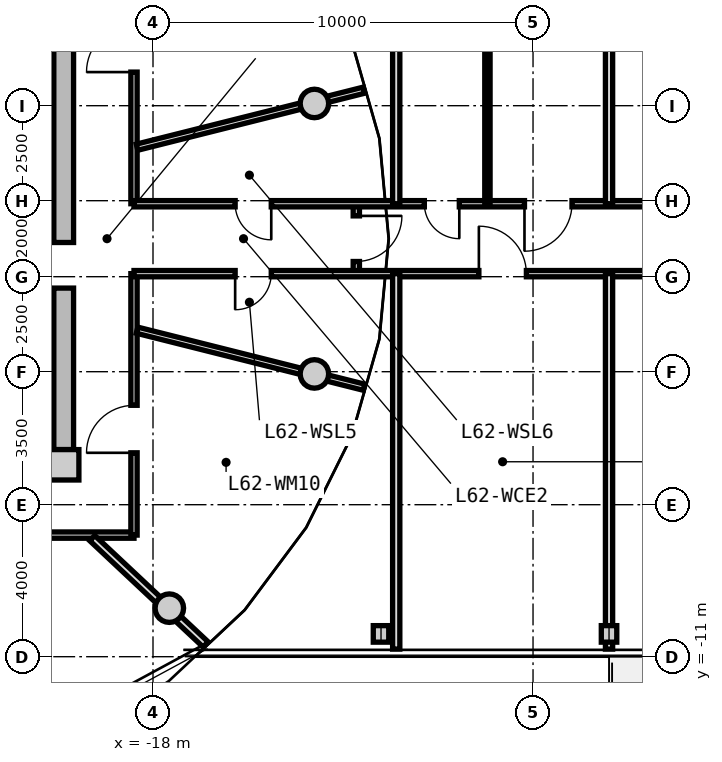
"""IFC4 building model, lengths in metres.
Left out: names, types, materials, properties, quantities, classifications, styles, units other than length and angle.
Written with IfcOpenShell. Run it as: python <this file> out.ifc"""

import sys

from ifc_helpers import new_model, si_unit, direction, frame, frame_2d, origin, origin_2d, place, context, subcontext, project, spatial, rectangle, circle, i_section, extrude, source, transform, mapped, element, fill, save


model = new_model("IFC4")
c1 = context("Model", 3, precision=1e-05, world=origin(), true_north=direction((0.0, 1.0)))
c2 = subcontext(c1, "Body", "Model", "MODEL_VIEW")
j1 = project(units=[si_unit("LENGTHUNIT", "METRE"), si_unit("PLANEANGLEUNIT", "RADIAN")], contexts=[c1])
p1 = place(None, origin())
s1 = spatial("IfcSite", under=j1, at=p1, CompositionType="ELEMENT")
p2 = place(p1, origin())
s2 = spatial("IfcBuilding", under=s1, at=p2, CompositionType="ELEMENT")
p3 = place(p2, frame((0.0, 0.0, 199.8)))
s3 = spatial("IfcBuildingStorey", under=s2, at=p3, CompositionType="ELEMENT", Elevation=199.8)
m1 = source(origin(), c2, "Body", "SweptSolid", [
    extrude(rectangle(XDim=0.8, YDim=0.8, at=origin_2d()), origin(), (0.0, 0.0, 1.0), 4.0),
])
p4 = place(p3, frame((-20.35, -5.95, 0.0), z_axis=(0.0, 0.0, 1.0), x_axis=(1.0, 0.0, 0.0)))
e1 = element("IfcColumn", 1, at=p4, inside=s3, PredefinedType="COLUMN", context=c2, shape_type="MappedRepresentation", body=[
    mapped(m1, transform((0.0, 0.0, 0.0), x_axis=(1.0, 0.0, 0.0), y_axis=(0.0, 1.0, 0.0), z_axis=(0.0, 0.0, 1.0), scale=1.0)),
])
m2 = source(origin(), c2, "Body", "SweptSolid", [
    extrude(rectangle(XDim=11.1, YDim=0.52, at=frame_2d((5.55, 0.0))), origin(), (0.0, 0.0, 1.0), 3.71),
])
p5 = place(p3, frame((-20.35, 5.55, 0.0), z_axis=(0.0, 0.0, 1.0), x_axis=(0.0, -1.0, 0.0)))
e2 = element("IfcWall", 2, at=p5, inside=s3, PredefinedType="SHEAR", context=c2, shape_type="MappedRepresentation", body=[
    mapped(m2, transform((0.0, 0.0, 0.0), x_axis=(1.0, 0.0, 0.0), y_axis=(0.0, 1.0, 0.0), z_axis=(0.0, 0.0, 1.0), scale=1.0)),
])
p6 = place(p5, frame((5.65, 0.0, 0.0)))
e3 = element("IfcOpeningElement", 3, at=p6, cuts=e2, PredefinedType="OPENING", context=c2, shape_type="SweptSolid", body=[
    extrude(rectangle(XDim=1.2, YDim=2.15, at=frame_2d((0.6, 1.075))), frame((0.0, 0.27, 0.0), z_axis=(0.0, -1.0, 0.0), x_axis=(1.0, 0.0, 0.0)), (0.0, 0.0, 1.0), 0.54),
])
m3 = source(origin(), c2, "Body", "SweptSolid", [
    extrude(circle(Radius=0.375, at=origin_2d()), origin(), (0.0, 0.0, 1.0), 4.0),
])
for number, where, z_axis, x_axis in (
    (4, (-13.753, 3.559, 0.0), (0.0, 0.0, 1.0), (1.0, 0.0, 0.0)),
    (5, (-17.57, -9.723, 0.0), (0.0, 0.0, 1.0), (1.0, 0.0, 0.0)),
    (6, (-13.753, -3.559, 0.0), (0.0, 0.0, 1.0), (1.0, 0.0, 0.0)),
):
    element("IfcColumn", number, at=place(p3, frame(where, z_axis=z_axis, x_axis=x_axis)), inside=s3, PredefinedType="COLUMN", context=c2, shape_type="MappedRepresentation", body=[
        mapped(m3, transform((0.0, 0.0, 0.0), x_axis=(1.0, 0.0, 0.0), y_axis=(0.0, 1.0, 0.0), z_axis=(0.0, 0.0, 1.0), scale=1.0)),
    ])
m4 = source(origin(), c2, "Body", "SweptSolid", [
    extrude(i_section(OverallWidth=0.407, OverallDepth=0.435, WebThickness=0.024, FlangeThickness=0.039, FilletRadius=0.015, at=origin_2d()), origin(), (0.0, 0.0, 1.0), 4.42),
])
for number, where, z_axis, x_axis in (
    (7, (-12.0, -10.4, -0.42), (0.0, 0.0, 1.0), (1.0, 0.0, 0.0)),
    (8, (-6.0, -10.4, -0.42), (0.0, 0.0, 1.0), (1.0, 0.0, 0.0)),
):
    element("IfcColumn", number, at=place(p3, frame(where, z_axis=z_axis, x_axis=x_axis)), inside=s3, PredefinedType="COLUMN", context=c2, shape_type="MappedRepresentation", body=[
        mapped(m4, transform((0.0, 0.0, 0.0), x_axis=(1.0, 0.0, 0.0), y_axis=(0.0, 1.0, 0.0), z_axis=(0.0, 0.0, 1.0), scale=1.0)),
    ])
m5 = source(origin(), c2, "Body", "SweptSolid", [
    extrude(rectangle(XDim=19.0, YDim=0.165, at=frame_2d((9.5, 0.0))), origin(), (0.0, 0.0, 1.0), 3.695),
])
p7 = place(p3, frame((-18.5, -7.8, 0.0), z_axis=(0.0, 0.0, 1.0), x_axis=(-1.0, 0.0, 0.0)))
e9 = element("IfcWall", 9, at=p7, inside=s3, PredefinedType="PARTITIONING", context=c2, shape_type="MappedRepresentation", body=[
    mapped(m5, transform((0.0, 0.0, 0.0), x_axis=(1.0, 0.0, 0.0), y_axis=(0.0, 1.0, 0.0), z_axis=(0.0, 0.0, 1.0), scale=1.0)),
])
p8 = place(p7, frame((15.586, 0.0, 0.0)))
e10 = element("IfcOpeningElement", 10, at=p8, cuts=e9, PredefinedType="OPENING", context=c2, shape_type="SweptSolid", body=[
    extrude(rectangle(XDim=1.05, YDim=2.15, at=frame_2d((0.525, 1.075))), frame((0.0, 0.093, 0.0), z_axis=(0.0, -1.0, 0.0), x_axis=(1.0, 0.0, 0.0)), (0.0, 0.0, 1.0), 0.185),
])
p9 = place(p7, frame((12.465, 0.0, 0.0)))
e11 = element("IfcOpeningElement", 11, at=p9, cuts=e9, PredefinedType="OPENING", context=c2, shape_type="SweptSolid", body=[
    extrude(rectangle(XDim=1.05, YDim=2.15, at=frame_2d((0.525, 1.075))), frame((0.0, 0.093, 0.0), z_axis=(0.0, -1.0, 0.0), x_axis=(1.0, 0.0, 0.0)), (0.0, 0.0, 1.0), 0.185),
])
p10 = place(p7, frame((8.875, 0.0, 0.0)))
e12 = element("IfcOpeningElement", 12, at=p10, cuts=e9, PredefinedType="OPENING", context=c2, shape_type="SweptSolid", body=[
    extrude(rectangle(XDim=1.25, YDim=2.2, at=frame_2d((0.625, 1.1))), frame((0.0, 0.093, 0.0), z_axis=(0.0, -1.0, 0.0), x_axis=(1.0, 0.0, 0.0)), (0.0, 0.0, 1.0), 0.185),
])
p11 = place(p7, frame((3.559, 0.0, 0.0)))
e13 = element("IfcOpeningElement", 13, at=p11, cuts=e9, PredefinedType="OPENING", context=c2, shape_type="SweptSolid", body=[
    extrude(rectangle(XDim=1.25, YDim=2.2, at=frame_2d((0.625, 1.1))), frame((0.0, 0.093, 0.0), z_axis=(0.0, -1.0, 0.0), x_axis=(1.0, 0.0, 0.0)), (0.0, 0.0, 1.0), 0.185),
])
m6 = source(origin(), c2, "Body", "SweptSolid", [
    extrude(rectangle(XDim=6.88, YDim=0.165, at=frame_2d((3.44, 0.0))), origin(), (0.0, 0.0, 1.0), 3.695),
])
p12 = place(p3, frame((-18.5, 7.8, 0.0), z_axis=(0.0, 0.0, 1.0), x_axis=(0.0, -1.0, 0.0)))
e14 = element("IfcWall", 14, at=p12, inside=s3, PredefinedType="PARTITIONING", context=c2, shape_type="MappedRepresentation", body=[
    mapped(m6, transform((0.0, 0.0, 0.0), x_axis=(1.0, 0.0, 0.0), y_axis=(0.0, 1.0, 0.0), z_axis=(0.0, 0.0, 1.0), scale=1.0)),
])
p13 = place(p12, frame((2.166, 0.0, 0.0)))
e15 = element("IfcOpeningElement", 15, at=p13, cuts=e14, PredefinedType="OPENING", context=c2, shape_type="SweptSolid", body=[
    extrude(rectangle(XDim=1.25, YDim=2.2, at=frame_2d((0.625, 1.1))), frame((0.0, 0.093, 0.0), z_axis=(0.0, -1.0, 0.0), x_axis=(1.0, 0.0, 0.0)), (0.0, 0.0, 1.0), 0.185),
])
p14 = place(p3, frame((-18.5, -0.92, 0.0), z_axis=(0.0, 0.0, 1.0), x_axis=(0.0, -1.0, 0.0)))
e16 = element("IfcWall", 16, at=p14, inside=s3, PredefinedType="PARTITIONING", context=c2, shape_type="MappedRepresentation", body=[
    mapped(m6, transform((0.0, 0.0, 0.0), x_axis=(1.0, 0.0, 0.0), y_axis=(0.0, 1.0, 0.0), z_axis=(0.0, 0.0, 1.0), scale=1.0)),
])
p15 = place(p14, frame((3.464, 0.0, 0.0)))
e17 = element("IfcOpeningElement", 17, at=p15, cuts=e16, PredefinedType="OPENING", context=c2, shape_type="SweptSolid", body=[
    extrude(rectangle(XDim=1.25, YDim=2.2, at=frame_2d((0.625, 1.1))), frame((0.0, 0.093, 0.0), z_axis=(0.0, -1.0, 0.0), x_axis=(1.0, 0.0, 0.0)), (0.0, 0.0, 1.0), 0.185),
])
m7 = source(origin(), c2, "Body", "SweptSolid", [
    extrude(rectangle(XDim=6.157, YDim=0.165, at=frame_2d((3.079, 0.0))), origin(), (0.0, 0.0, 1.0), 3.295),
])
for number, where, z_axis, x_axis in (
    (18, (-18.42, -2.407, 0.0), (0.0, 0.0, 1.0), (0.97, -0.244, 0.0)),
    (19, (-18.42, 2.407, 0.0), (0.0, 0.0, 1.0), (0.97, 0.244, 0.0)),
):
    element("IfcWall", number, at=place(p3, frame(where, z_axis=z_axis, x_axis=x_axis)), inside=s3, PredefinedType="PARTITIONING", context=c2, shape_type="MappedRepresentation", body=[
        mapped(m7, transform((0.0, 0.0, 0.0), x_axis=(1.0, 0.0, 0.0), y_axis=(0.0, 1.0, 0.0), z_axis=(0.0, 0.0, 1.0), scale=1.0)),
    ])
m8 = source(origin(), c2, "Body", "SweptSolid", [
    extrude(rectangle(XDim=4.089, YDim=0.19, at=frame_2d((2.044, 0.0))), origin(), (0.0, 0.0, 1.0), 3.295),
])
p16 = place(p3, frame((-19.598, -7.88, 0.0), z_axis=(0.0, 0.0, 1.0), x_axis=(0.729401273609, -0.684086092577, 0.0)))
e20 = element("IfcWall", 20, at=p16, inside=s3, PredefinedType="PARTITIONING", context=c2, shape_type="MappedRepresentation", body=[
    mapped(m8, transform((0.0, 0.0, 0.0), x_axis=(1.0, 0.0, 0.0), y_axis=(0.0, 1.0, 0.0), z_axis=(0.0, 0.0, 1.0), scale=1.0)),
])
m9 = source(origin(), c2, "Body", "SweptSolid", [
    extrude(rectangle(XDim=1.84, YDim=0.165, at=frame_2d((0.92, 0.0))), origin(), (0.0, 0.0, 1.0), 3.695),
])
p17 = place(p3, frame((-12.65, -0.92, 0.0), z_axis=(0.0, 0.0, 1.0), x_axis=(0.0, 1.0, 0.0)))
e21 = element("IfcWall", 21, at=p17, inside=s3, PredefinedType="PARTITIONING", context=c2, shape_type="MappedRepresentation", body=[
    mapped(m9, transform((0.0, 0.0, 0.0), x_axis=(1.0, 0.0, 0.0), y_axis=(0.0, 1.0, 0.0), z_axis=(0.0, 0.0, 1.0), scale=1.0)),
])
p18 = place(p17, frame((0.32, 0.0, 0.0)))
e22 = element("IfcOpeningElement", 22, at=p18, cuts=e21, PredefinedType="OPENING", context=c2, shape_type="SweptSolid", body=[
    extrude(rectangle(XDim=1.2, YDim=2.15, at=frame_2d((0.6, 1.075))), frame((0.0, 0.093, 0.0), z_axis=(0.0, -1.0, 0.0), x_axis=(1.0, 0.0, 0.0)), (0.0, 0.0, 1.0), 0.185),
])
m10 = source(origin(), c2, "Body", "SweptSolid", [
    extrude(rectangle(XDim=37.0, YDim=0.165, at=frame_2d((18.5, 0.0))), origin(), (0.0, 0.0, 1.0), 3.695),
])
p19 = place(p3, frame((-18.5, -0.92, 0.0), z_axis=(0.0, 0.0, 1.0), x_axis=(1.0, 0.0, 0.0)))
e23 = element("IfcWall", 23, at=p19, inside=s3, PredefinedType="PARTITIONING", context=c2, shape_type="MappedRepresentation", body=[
    mapped(m10, transform((0.0, 0.0, 0.0), x_axis=(1.0, 0.0, 0.0), y_axis=(0.0, 1.0, 0.0), z_axis=(0.0, 0.0, 1.0), scale=1.0)),
])
p20 = place(p19, frame((2.662, 0.0, 0.0)))
e24 = element("IfcOpeningElement", 24, at=p20, cuts=e23, PredefinedType="OPENING", context=c2, shape_type="SweptSolid", body=[
    extrude(rectangle(XDim=0.95, YDim=2.1, at=frame_2d((0.475, 1.05))), frame((0.0, 0.093, 0.0), z_axis=(0.0, -1.0, 0.0), x_axis=(1.0, 0.0, 0.0)), (0.0, 0.0, 1.0), 0.185),
])
p21 = place(p19, frame((33.388, 0.0, 0.0)))
e25 = element("IfcOpeningElement", 25, at=p21, cuts=e23, PredefinedType="OPENING", context=c2, shape_type="SweptSolid", body=[
    extrude(rectangle(XDim=0.95, YDim=2.1, at=frame_2d((0.475, 1.05))), frame((0.0, 0.093, 0.0), z_axis=(0.0, -1.0, 0.0), x_axis=(1.0, 0.0, 0.0)), (0.0, 0.0, 1.0), 0.185),
])
p22 = place(p19, frame((9.075, 0.0, 0.0)))
e26 = element("IfcOpeningElement", 26, at=p22, cuts=e23, PredefinedType="OPENING", context=c2, shape_type="SweptSolid", body=[
    extrude(rectangle(XDim=1.25, YDim=2.2, at=frame_2d((0.625, 1.1))), frame((0.0, 0.093, 0.0), z_axis=(0.0, -1.0, 0.0), x_axis=(1.0, 0.0, 0.0)), (0.0, 0.0, 1.0), 0.185),
])
p23 = place(p19, frame((17.875, 0.0, 0.0)))
e27 = element("IfcOpeningElement", 27, at=p23, cuts=e23, PredefinedType="OPENING", context=c2, shape_type="SweptSolid", body=[
    extrude(rectangle(XDim=1.25, YDim=2.2, at=frame_2d((0.625, 1.1))), frame((0.0, 0.093, 0.0), z_axis=(0.0, -1.0, 0.0), x_axis=(1.0, 0.0, 0.0)), (0.0, 0.0, 1.0), 0.185),
])
p24 = place(p19, frame((26.675, 0.0, 0.0)))
e28 = element("IfcOpeningElement", 28, at=p24, cuts=e23, PredefinedType="OPENING", context=c2, shape_type="SweptSolid", body=[
    extrude(rectangle(XDim=1.25, YDim=2.2, at=frame_2d((0.625, 1.1))), frame((0.0, 0.093, 0.0), z_axis=(0.0, -1.0, 0.0), x_axis=(1.0, 0.0, 0.0)), (0.0, 0.0, 1.0), 0.185),
])
p25 = place(p3, frame((-18.5, 0.92, 0.0), z_axis=(0.0, 0.0, 1.0), x_axis=(1.0, 0.0, 0.0)))
e29 = element("IfcWall", 29, at=p25, inside=s3, PredefinedType="PARTITIONING", context=c2, shape_type="MappedRepresentation", body=[
    mapped(m10, transform((0.0, 0.0, 0.0), x_axis=(1.0, 0.0, 0.0), y_axis=(0.0, 1.0, 0.0), z_axis=(0.0, 0.0, 1.0), scale=1.0)),
])
p26 = place(p25, frame((2.662, 0.0, 0.0)))
e30 = element("IfcOpeningElement", 30, at=p26, cuts=e29, PredefinedType="OPENING", context=c2, shape_type="SweptSolid", body=[
    extrude(rectangle(XDim=0.95, YDim=2.1, at=frame_2d((0.475, 1.05))), frame((0.0, 0.093, 0.0), z_axis=(0.0, -1.0, 0.0), x_axis=(1.0, 0.0, 0.0)), (0.0, 0.0, 1.0), 0.185),
])
p27 = place(p25, frame((33.388, 0.0, 0.0)))
e31 = element("IfcOpeningElement", 31, at=p27, cuts=e29, PredefinedType="OPENING", context=c2, shape_type="SweptSolid", body=[
    extrude(rectangle(XDim=0.95, YDim=2.1, at=frame_2d((0.475, 1.05))), frame((0.0, 0.093, 0.0), z_axis=(0.0, -1.0, 0.0), x_axis=(1.0, 0.0, 0.0)), (0.0, 0.0, 1.0), 0.185),
])
p28 = place(p25, frame((7.64, 0.0, 0.0)))
e32 = element("IfcOpeningElement", 32, at=p28, cuts=e29, PredefinedType="OPENING", context=c2, shape_type="SweptSolid", body=[
    extrude(rectangle(XDim=0.92, YDim=2.1, at=frame_2d((0.46, 1.05))), frame((0.0, 0.093, 0.0), z_axis=(0.0, -1.0, 0.0), x_axis=(1.0, 0.0, 0.0)), (0.0, 0.0, 1.0), 0.185),
])
p29 = place(p25, frame((10.275, 0.0, 0.0)))
e33 = element("IfcOpeningElement", 33, at=p29, cuts=e29, PredefinedType="OPENING", context=c2, shape_type="SweptSolid", body=[
    extrude(rectangle(XDim=1.25, YDim=2.2, at=frame_2d((0.625, 1.1))), frame((0.0, 0.093, 0.0), z_axis=(0.0, -1.0, 0.0), x_axis=(1.0, 0.0, 0.0)), (0.0, 0.0, 1.0), 0.185),
])
p30 = place(p25, frame((17.875, 0.0, 0.0)))
e34 = element("IfcOpeningElement", 34, at=p30, cuts=e29, PredefinedType="OPENING", context=c2, shape_type="SweptSolid", body=[
    extrude(rectangle(XDim=1.25, YDim=2.2, at=frame_2d((0.625, 1.1))), frame((0.0, 0.093, 0.0), z_axis=(0.0, -1.0, 0.0), x_axis=(1.0, 0.0, 0.0)), (0.0, 0.0, 1.0), 0.185),
])
p31 = place(p25, frame((26.675, 0.0, 0.0)))
e35 = element("IfcOpeningElement", 35, at=p31, cuts=e29, PredefinedType="OPENING", context=c2, shape_type="SweptSolid", body=[
    extrude(rectangle(XDim=1.25, YDim=2.2, at=frame_2d((0.625, 1.1))), frame((0.0, 0.093, 0.0), z_axis=(0.0, -1.0, 0.0), x_axis=(1.0, 0.0, 0.0)), (0.0, 0.0, 1.0), 0.185),
])
m11 = source(origin(), c2, "Body", "SweptSolid", [
    extrude(rectangle(XDim=9.88, YDim=0.19, at=frame_2d((4.94, 0.0))), origin(), (0.0, 0.0, 1.0), 3.695),
])
for number, where, z_axis, x_axis in (
    (36, (-11.6, -10.8, 0.0), (0.0, 0.0, 1.0), (0.0, 1.0, 0.0)),
    (37, (-11.6, 0.92, 0.0), (0.0, 0.0, 1.0), (0.0, 1.0, 0.0)),
):
    element("IfcWall", number, at=place(p3, frame(where, z_axis=z_axis, x_axis=x_axis)), inside=s3, PredefinedType="PARTITIONING", context=c2, shape_type="MappedRepresentation", body=[
        mapped(m11, transform((0.0, 0.0, 0.0), x_axis=(1.0, 0.0, 0.0), y_axis=(0.0, 1.0, 0.0), z_axis=(0.0, 0.0, 1.0), scale=1.0)),
    ])
m12 = source(origin(), c2, "Body", "SweptSolid", [
    extrude(rectangle(XDim=9.88, YDim=0.19, at=frame_2d((4.94, 0.0))), origin(), (0.0, 0.0, 1.0), 2.995),
])
for number, where, z_axis, x_axis in (
    (38, (-6.0, -10.8, 0.0), (0.0, 0.0, 1.0), (0.0, 1.0, 0.0)),
    (39, (-6.0, 0.92, 0.0), (0.0, 0.0, 1.0), (0.0, 1.0, 0.0)),
):
    element("IfcWall", number, at=place(p3, frame(where, z_axis=z_axis, x_axis=x_axis)), inside=s3, PredefinedType="PARTITIONING", context=c2, shape_type="MappedRepresentation", body=[
        mapped(m12, transform((0.0, 0.0, 0.0), x_axis=(1.0, 0.0, 0.0), y_axis=(0.0, 1.0, 0.0), z_axis=(0.0, 0.0, 1.0), scale=1.0)),
    ])
m13 = source(origin(), c2, "Body", "SweptSolid", [
    extrude(rectangle(XDim=9.88, YDim=0.14, at=frame_2d((4.94, 0.0))), origin(), (0.0, 0.0, 1.0), 3.695),
])
p32 = place(p3, frame((-9.2, 0.92, 0.0), z_axis=(0.0, 0.0, 1.0), x_axis=(0.0, 1.0, 0.0)))
e40 = element("IfcWall", 40, at=p32, inside=s3, PredefinedType="PARTITIONING", context=c2, shape_type="MappedRepresentation", body=[
    mapped(m13, transform((0.0, 0.0, 0.0), x_axis=(1.0, 0.0, 0.0), y_axis=(0.0, 1.0, 0.0), z_axis=(0.0, 0.0, 1.0), scale=1.0)),
])
m14 = source(origin(), c2, "Body", "SweptSolid", [
    extrude(rectangle(XDim=1.2, YDim=2.15, at=frame_2d((0.6, 1.075))), frame((0.0, 0.025, 0.0), z_axis=(0.0, -1.0, 0.0), x_axis=(1.0, 0.0, 0.0)), (0.0, 0.0, 1.0), 0.05),
])
p33 = place(p6, frame((1.2, 0.0, 0.0), z_axis=(0.0, 0.0, 1.0), x_axis=(-1.0, 0.0, 0.0)))
e41 = element("IfcDoor", 41, at=p33, inside=s3, OperationType="SINGLE_SWING_RIGHT", PredefinedType="DOOR", context=c2, shape_type="MappedRepresentation", body=[
    mapped(m14, transform((0.0, 0.0, 0.0), x_axis=(1.0, 0.0, 0.0), y_axis=(0.0, 1.0, 0.0), z_axis=(0.0, 0.0, 1.0), scale=1.0)),
])
fill(e3, e41)
m15 = source(origin(), c2, "Body", "SweptSolid", [
    extrude(rectangle(XDim=0.95, YDim=2.1, at=frame_2d((0.475, 1.05))), frame((0.0, 0.025, 0.0), z_axis=(0.0, -1.0, 0.0), x_axis=(1.0, 0.0, 0.0)), (0.0, 0.0, 1.0), 0.05),
])
p34 = place(p20, frame((0.95, 0.0, 0.0), z_axis=(0.0, 0.0, 1.0), x_axis=(-1.0, 0.0, 0.0)))
e42 = element("IfcDoor", 42, at=p34, inside=s3, OperationType="SINGLE_SWING_RIGHT", PredefinedType="DOOR", context=c2, shape_type="MappedRepresentation", body=[
    mapped(m15, transform((0.0, 0.0, 0.0), x_axis=(1.0, 0.0, 0.0), y_axis=(0.0, 1.0, 0.0), z_axis=(0.0, 0.0, 1.0), scale=1.0)),
])
fill(e24, e42)
p35 = place(p26, frame((0.95, 0.0, 0.0), z_axis=(0.0, 0.0, 1.0), x_axis=(-1.0, 0.0, 0.0)))
e43 = element("IfcDoor", 43, at=p35, inside=s3, OperationType="SINGLE_SWING_LEFT", PredefinedType="DOOR", context=c2, shape_type="MappedRepresentation", body=[
    mapped(m15, transform((0.0, 0.0, 0.0), x_axis=(1.0, 0.0, 0.0), y_axis=(0.0, 1.0, 0.0), z_axis=(0.0, 0.0, 1.0), scale=1.0)),
])
fill(e30, e43)
m16 = source(origin(), c2, "Body", "SweptSolid", [
    extrude(rectangle(XDim=1.25, YDim=2.2, at=frame_2d((0.625, 1.1))), frame((0.0, 0.025, 0.0), z_axis=(0.0, -1.0, 0.0), x_axis=(1.0, 0.0, 0.0)), (0.0, 0.0, 1.0), 0.05),
])
p36 = place(p13, frame((1.25, 0.0, 0.0), z_axis=(0.0, 0.0, 1.0), x_axis=(-1.0, 0.0, 0.0)))
e44 = element("IfcDoor", 44, at=p36, inside=s3, OperationType="SINGLE_SWING_LEFT", PredefinedType="DOOR", context=c2, shape_type="MappedRepresentation", body=[
    mapped(m16, transform((0.0, 0.0, 0.0), x_axis=(1.0, 0.0, 0.0), y_axis=(0.0, 1.0, 0.0), z_axis=(0.0, 0.0, 1.0), scale=1.0)),
])
fill(e15, e44)
p37 = place(p15, frame((1.25, 0.0, 0.0), z_axis=(0.0, 0.0, 1.0), x_axis=(-1.0, 0.0, 0.0)))
e45 = element("IfcDoor", 45, at=p37, inside=s3, OperationType="SINGLE_SWING_LEFT", PredefinedType="DOOR", context=c2, shape_type="MappedRepresentation", body=[
    mapped(m16, transform((0.0, 0.0, 0.0), x_axis=(1.0, 0.0, 0.0), y_axis=(0.0, 1.0, 0.0), z_axis=(0.0, 0.0, 1.0), scale=1.0)),
])
fill(e17, e45)
p38 = place(p18, frame((1.2, 0.0, 0.0), z_axis=(0.0, 0.0, 1.0), x_axis=(-1.0, 0.0, 0.0)))
e46 = element("IfcDoor", 46, at=p38, inside=s3, OperationType="SINGLE_SWING_LEFT", PredefinedType="DOOR", context=c2, shape_type="MappedRepresentation", body=[
    mapped(m14, transform((0.0, 0.0, 0.0), x_axis=(1.0, 0.0, 0.0), y_axis=(0.0, 1.0, 0.0), z_axis=(0.0, 0.0, 1.0), scale=1.0)),
])
fill(e22, e46)
p39 = place(p22, origin())
e47 = element("IfcDoor", 47, at=p39, inside=s3, OperationType="SINGLE_SWING_LEFT", PredefinedType="DOOR", context=c2, shape_type="MappedRepresentation", body=[
    mapped(m16, transform((0.0, 0.0, 0.0), x_axis=(1.0, 0.0, 0.0), y_axis=(0.0, 1.0, 0.0), z_axis=(0.0, 0.0, 1.0), scale=1.0)),
])
fill(e26, e47)
m17 = source(origin(), c2, "Body", "SweptSolid", [
    extrude(rectangle(XDim=0.92, YDim=2.1, at=frame_2d((0.46, 1.05))), frame((0.0, 0.025, 0.0), z_axis=(0.0, -1.0, 0.0), x_axis=(1.0, 0.0, 0.0)), (0.0, 0.0, 1.0), 0.05),
])
p40 = place(p28, frame((0.92, 0.0, 0.0), z_axis=(0.0, 0.0, 1.0), x_axis=(-1.0, 0.0, 0.0)))
e48 = element("IfcDoor", 48, at=p40, inside=s3, OperationType="SINGLE_SWING_LEFT", PredefinedType="DOOR", context=c2, shape_type="MappedRepresentation", body=[
    mapped(m17, transform((0.0, 0.0, 0.0), x_axis=(1.0, 0.0, 0.0), y_axis=(0.0, 1.0, 0.0), z_axis=(0.0, 0.0, 1.0), scale=1.0)),
])
fill(e32, e48)
p41 = place(p29, frame((1.25, 0.0, 0.0), z_axis=(0.0, 0.0, 1.0), x_axis=(-1.0, 0.0, 0.0)))
e49 = element("IfcDoor", 49, at=p41, inside=s3, OperationType="SINGLE_SWING_RIGHT", PredefinedType="DOOR", context=c2, shape_type="MappedRepresentation", body=[
    mapped(m16, transform((0.0, 0.0, 0.0), x_axis=(1.0, 0.0, 0.0), y_axis=(0.0, 1.0, 0.0), z_axis=(0.0, 0.0, 1.0), scale=1.0)),
])
fill(e33, e49)
save(model, sys.argv[1])
